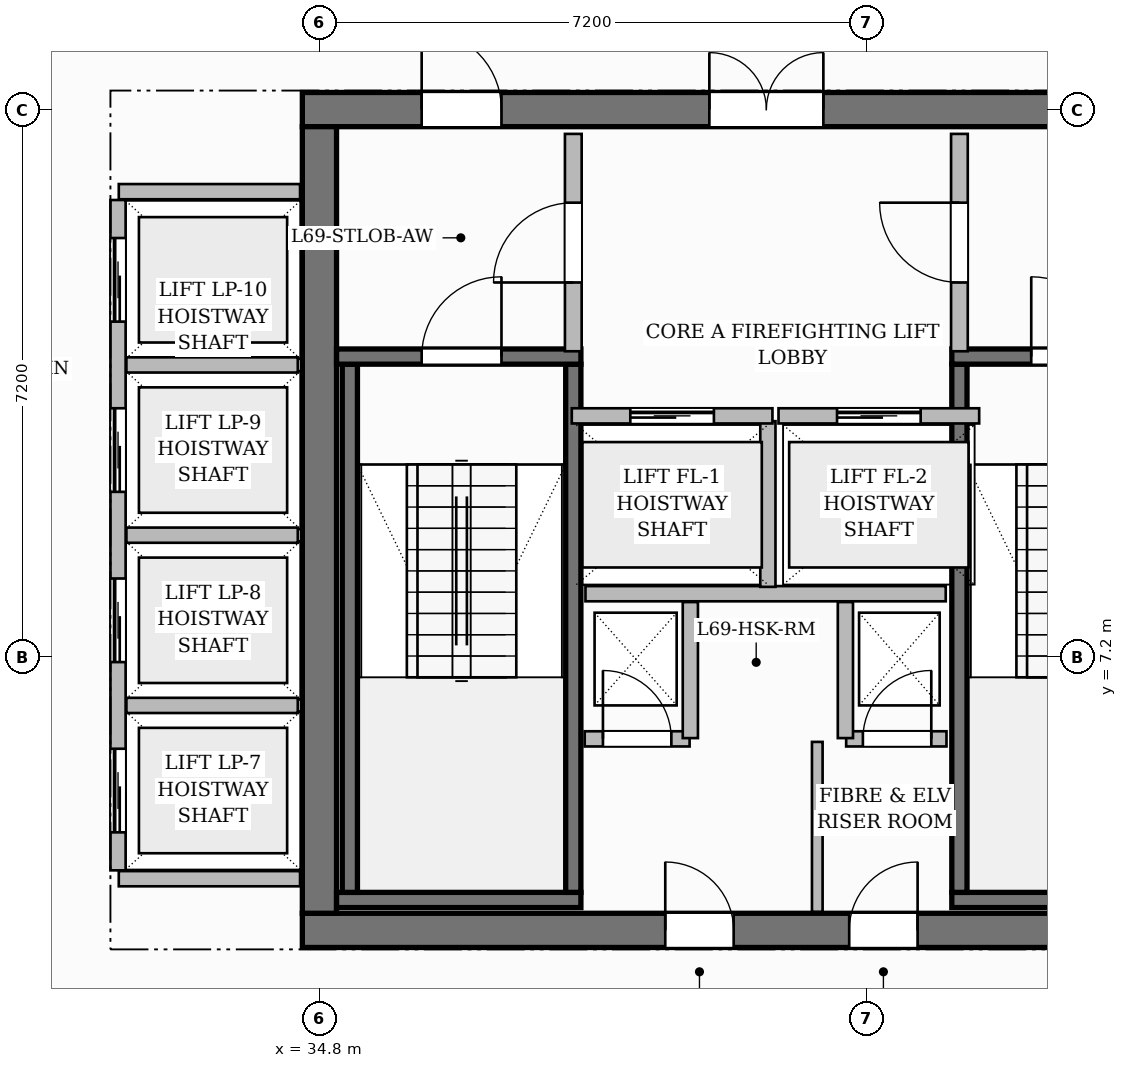
"""IFC4 building model, lengths in metres.
Left out: names, types, materials, properties, quantities, classifications, styles, units other than length and angle.
Written with IfcOpenShell. Run it as: python <this file> out.ifc"""

import sys

from ifc_helpers import new_model, si_unit, direction, frame, frame_2d, origin, place, context, subcontext, project, spatial, rectangle, extrude, source, transform, mapped, element, fill, save


model = new_model("IFC4")
c1 = context("Model", 3, precision=1e-05, world=origin(), true_north=direction((0.0, 1.0)))
c2 = subcontext(c1, "Body", "Model", "MODEL_VIEW")
j1 = project(units=[si_unit("LENGTHUNIT", "METRE"), si_unit("PLANEANGLEUNIT", "RADIAN")], contexts=[c1])
p1 = place(None, origin())
s1 = spatial("IfcSite", under=j1, at=p1, CompositionType="ELEMENT")
p2 = place(p1, origin())
s2 = spatial("IfcBuilding", under=s1, at=p2, CompositionType="ELEMENT")
p3 = place(p2, frame((0.0, 0.0, 275.05)))
s3 = spatial("IfcBuildingStorey", under=s2, at=p3, CompositionType="ELEMENT", Elevation=275.05)
p4 = place(p3, frame((34.575, 3.6, 0.0), z_axis=(0.0, 0.0, 1.0), x_axis=(1.0, 0.0, 0.0)))
e1 = element("IfcWall", 1, at=p4, inside=s3, PredefinedType="SHEAR", context=c2, shape_type="SweptSolid", body=[
    extrude(rectangle(XDim=15.45, YDim=0.45, at=frame_2d((7.725, 0.0))), origin(), (0.0, 0.0, 1.0), 3.85),
])
p5 = place(p4, frame((4.775, 0.0, 0.0)))
e2 = element("IfcOpeningElement", 2, at=p5, cuts=e1, PredefinedType="OPENING", context=c2, shape_type="SweptSolid", body=[
    extrude(rectangle(XDim=0.9, YDim=2.1, at=frame_2d((0.45, 1.05))), frame((0.0, 0.235, 0.0), z_axis=(0.0, -1.0, 0.0), x_axis=(1.0, 0.0, 0.0)), (0.0, 0.0, 1.0), 0.47),
])
p6 = place(p4, frame((7.195, 0.0, 0.0)))
e3 = element("IfcOpeningElement", 3, at=p6, cuts=e1, PredefinedType="OPENING", context=c2, shape_type="SweptSolid", body=[
    extrude(rectangle(XDim=0.9, YDim=2.1, at=frame_2d((0.45, 1.05))), frame((0.0, 0.235, 0.0), z_axis=(0.0, -1.0, 0.0), x_axis=(1.0, 0.0, 0.0)), (0.0, 0.0, 1.0), 0.47),
])
p7 = place(p3, frame((34.575, 14.4, 0.0), z_axis=(0.0, 0.0, 1.0), x_axis=(1.0, 0.0, 0.0)))
e4 = element("IfcWall", 4, at=p7, inside=s3, PredefinedType="SHEAR", context=c2, shape_type="SweptSolid", body=[
    extrude(rectangle(XDim=15.45, YDim=0.45, at=frame_2d((7.725, 0.0))), origin(), (0.0, 0.0, 1.0), 3.85),
])
p8 = place(p7, frame((5.355, 0.0, 0.0)))
e5 = element("IfcOpeningElement", 5, at=p8, cuts=e4, PredefinedType="OPENING", context=c2, shape_type="SweptSolid", body=[
    extrude(rectangle(XDim=1.5, YDim=2.2, at=frame_2d((0.75, 1.1))), frame((0.0, 0.235, 0.0), z_axis=(0.0, -1.0, 0.0), x_axis=(1.0, 0.0, 0.0)), (0.0, 0.0, 1.0), 0.47),
])
p9 = place(p7, frame((1.57, 0.0, 0.0)))
e6 = element("IfcOpeningElement", 6, at=p9, cuts=e4, PredefinedType="OPENING", context=c2, shape_type="SweptSolid", body=[
    extrude(rectangle(XDim=1.05, YDim=2.15, at=frame_2d((0.525, 1.075))), frame((0.0, 0.235, 0.0), z_axis=(0.0, -1.0, 0.0), x_axis=(1.0, 0.0, 0.0)), (0.0, 0.0, 1.0), 0.47),
])
p10 = place(p7, frame((11.2, 0.0, 0.0)))
e7 = element("IfcOpeningElement", 7, at=p10, cuts=e4, PredefinedType="OPENING", context=c2, shape_type="SweptSolid", body=[
    extrude(rectangle(XDim=1.05, YDim=2.15, at=frame_2d((0.525, 1.075))), frame((0.0, 0.235, 0.0), z_axis=(0.0, -1.0, 0.0), x_axis=(1.0, 0.0, 0.0)), (0.0, 0.0, 1.0), 0.47),
])
p11 = place(p3, frame((34.8, 3.825, 0.0), z_axis=(0.0, 0.0, 1.0), x_axis=(0.0, 1.0, 0.0)))
e8 = element("IfcWall", 8, at=p11, inside=s3, PredefinedType="SHEAR", context=c2, shape_type="SweptSolid", body=[
    extrude(rectangle(XDim=10.35, YDim=0.45, at=frame_2d((5.175, 0.0))), origin(), (0.0, 0.0, 1.0), 3.85),
])
p12 = place(p3, frame((35.025, 4.0, 0.0), z_axis=(0.0, 0.0, 1.0), x_axis=(1.0, 0.0, 0.0)))
e9 = element("IfcWall", 9, at=p12, inside=s3, PredefinedType="SHEAR", context=c2, shape_type="SweptSolid", body=[
    extrude(rectangle(XDim=3.215, YDim=0.2, at=frame_2d((1.607, 0.0))), origin(), (0.0, 0.0, 1.0), 3.85),
])
for number, where, z_axis, x_axis in (
    (10, (35.2, 4.1, 0.0), (0.0, 0.0, 1.0), (0.0, 1.0, 0.0)),
    (11, (38.14, 4.1, 0.0), (0.0, 0.0, 1.0), (0.0, 1.0, 0.0)),
):
    element("IfcWall", number, at=place(p3, frame(where, z_axis=z_axis, x_axis=x_axis)), inside=s3, PredefinedType="SHEAR", context=c2, shape_type="SweptSolid", body=[
        extrude(rectangle(XDim=6.95, YDim=0.2, at=frame_2d((3.475, 0.0))), origin(), (0.0, 0.0, 1.0), 3.85),
    ])
p13 = place(p3, frame((35.025, 11.15, 0.0), z_axis=(0.0, 0.0, 1.0), x_axis=(1.0, 0.0, 0.0)))
e12 = element("IfcWall", 12, at=p13, inside=s3, PredefinedType="SHEAR", context=c2, shape_type="SweptSolid", body=[
    extrude(rectangle(XDim=3.215, YDim=0.2, at=frame_2d((1.607, 0.0))), origin(), (0.0, 0.0, 1.0), 3.85),
])
p14 = place(p13, frame((1.12, 0.0, 0.0)))
e13 = element("IfcOpeningElement", 13, at=p14, cuts=e12, PredefinedType="OPENING", context=c2, shape_type="SweptSolid", body=[
    extrude(rectangle(XDim=1.05, YDim=2.2, at=frame_2d((0.525, 1.1))), frame((0.0, 0.11, 0.0), z_axis=(0.0, -1.0, 0.0), x_axis=(1.0, 0.0, 0.0)), (0.0, 0.0, 1.0), 0.22),
])
p15 = place(p3, frame((43.12, 4.0, 0.0), z_axis=(0.0, 0.0, 1.0), x_axis=(1.0, 0.0, 0.0)))
e14 = element("IfcWall", 14, at=p15, inside=s3, PredefinedType="SHEAR", context=c2, shape_type="SweptSolid", body=[
    extrude(rectangle(XDim=6.455, YDim=0.2, at=frame_2d((3.228, 0.0))), origin(), (0.0, 0.0, 1.0), 3.85),
])
p16 = place(p3, frame((43.22, 4.1, 0.0), z_axis=(0.0, 0.0, 1.0), x_axis=(0.0, 1.0, 0.0)))
e15 = element("IfcWall", 15, at=p16, inside=s3, PredefinedType="SHEAR", context=c2, shape_type="SweptSolid", body=[
    extrude(rectangle(XDim=6.95, YDim=0.2, at=frame_2d((3.475, 0.0))), origin(), (0.0, 0.0, 1.0), 3.85),
])
p17 = place(p3, frame((43.12, 11.15, 0.0), z_axis=(0.0, 0.0, 1.0), x_axis=(1.0, 0.0, 0.0)))
e16 = element("IfcWall", 16, at=p17, inside=s3, PredefinedType="SHEAR", context=c2, shape_type="SweptSolid", body=[
    extrude(rectangle(XDim=6.455, YDim=0.2, at=frame_2d((3.228, 0.0))), origin(), (0.0, 0.0, 1.0), 3.85),
])
p18 = place(p17, frame((1.045, 0.0, 0.0)))
e17 = element("IfcOpeningElement", 17, at=p18, cuts=e16, PredefinedType="OPENING", context=c2, shape_type="SweptSolid", body=[
    extrude(rectangle(XDim=1.05, YDim=2.2, at=frame_2d((0.525, 1.1))), frame((0.0, 0.11, 0.0), z_axis=(0.0, -1.0, 0.0), x_axis=(1.0, 0.0, 0.0)), (0.0, 0.0, 1.0), 0.22),
])
p19 = place(p17, frame((4.125, 0.0, 0.0)))
e18 = element("IfcOpeningElement", 18, at=p19, cuts=e16, PredefinedType="OPENING", context=c2, shape_type="SweptSolid", body=[
    extrude(rectangle(XDim=1.05, YDim=2.2, at=frame_2d((0.525, 1.1))), frame((0.0, 0.11, 0.0), z_axis=(0.0, -1.0, 0.0), x_axis=(1.0, 0.0, 0.0)), (0.0, 0.0, 1.0), 0.22),
])
p20 = place(p3, frame((38.3, 8.03, 0.0), z_axis=(0.0, 0.0, 1.0), x_axis=(1.0, 0.0, 0.0)))
e19 = element("IfcWall", 19, at=p20, inside=s3, PredefinedType="PARTITIONING", context=c2, shape_type="SweptSolid", body=[
    extrude(rectangle(XDim=4.74, YDim=0.2, at=frame_2d((2.37, 0.0))), origin(), (0.0, 0.0, 1.0), 3.6),
])
p21 = place(p3, frame((40.7, 8.12, 0.0), z_axis=(0.0, 0.0, 1.0), x_axis=(0.0, 1.0, 0.0)))
e20 = element("IfcWall", 20, at=p21, inside=s3, PredefinedType="PARTITIONING", context=c2, shape_type="SweptSolid", body=[
    extrude(rectangle(XDim=2.18, YDim=0.2, at=frame_2d((1.09, 0.0))), origin(), (0.0, 0.0, 1.0), 3.6),
])
p22 = place(p3, frame((38.14, 11.22, 0.0), z_axis=(0.0, 0.0, 1.0), x_axis=(0.0, 1.0, 0.0)))
e21 = element("IfcWall", 21, at=p22, inside=s3, PredefinedType="PARTITIONING", context=c2, shape_type="SweptSolid", body=[
    extrude(rectangle(XDim=2.86, YDim=0.22, at=frame_2d((1.43, 0.0))), origin(), (0.0, 0.0, 1.0), 3.6),
])
p23 = place(p22, frame((0.905, 0.0, 0.0)))
e22 = element("IfcOpeningElement", 22, at=p23, cuts=e21, PredefinedType="OPENING", context=c2, shape_type="SweptSolid", body=[
    extrude(rectangle(XDim=1.05, YDim=2.15, at=frame_2d((0.525, 1.075))), frame((0.0, 0.12, 0.0), z_axis=(0.0, -1.0, 0.0), x_axis=(1.0, 0.0, 0.0)), (0.0, 0.0, 1.0), 0.24),
])
p24 = place(p3, frame((43.22, 11.22, 0.0), z_axis=(0.0, 0.0, 1.0), x_axis=(0.0, 1.0, 0.0)))
e23 = element("IfcWall", 23, at=p24, inside=s3, PredefinedType="PARTITIONING", context=c2, shape_type="SweptSolid", body=[
    extrude(rectangle(XDim=2.86, YDim=0.22, at=frame_2d((1.43, 0.0))), origin(), (0.0, 0.0, 1.0), 3.6),
])
p25 = place(p24, frame((0.905, 0.0, 0.0)))
e24 = element("IfcOpeningElement", 24, at=p25, cuts=e23, PredefinedType="OPENING", context=c2, shape_type="SweptSolid", body=[
    extrude(rectangle(XDim=1.05, YDim=2.15, at=frame_2d((0.525, 1.075))), frame((0.0, 0.12, 0.0), z_axis=(0.0, -1.0, 0.0), x_axis=(1.0, 0.0, 0.0)), (0.0, 0.0, 1.0), 0.24),
])
p26 = place(p3, frame((38.29, 6.12, 0.0), z_axis=(0.0, 0.0, 1.0), x_axis=(1.0, 0.0, 0.0)))
e25 = element("IfcWall", 25, at=p26, inside=s3, PredefinedType="PARTITIONING", context=c2, shape_type="SweptSolid", body=[
    extrude(rectangle(XDim=1.38, YDim=0.2, at=frame_2d((0.69, 0.0))), origin(), (0.0, 0.0, 1.0), 3.6),
])
p27 = place(p26, frame((0.24, 0.0, 0.0)))
e26 = element("IfcOpeningElement", 26, at=p27, cuts=e25, PredefinedType="OPENING", context=c2, shape_type="SweptSolid", body=[
    extrude(rectangle(XDim=0.9, YDim=2.1, at=frame_2d((0.45, 1.05))), frame((0.0, 0.11, 0.0), z_axis=(0.0, -1.0, 0.0), x_axis=(1.0, 0.0, 0.0)), (0.0, 0.0, 1.0), 0.22),
])
p28 = place(p3, frame((39.68, 6.13, 0.0), z_axis=(0.0, 0.0, 1.0), x_axis=(0.0, 1.0, 0.0)))
e27 = element("IfcWall", 27, at=p28, inside=s3, PredefinedType="PARTITIONING", context=c2, shape_type="SweptSolid", body=[
    extrude(rectangle(XDim=1.79, YDim=0.2, at=frame_2d((0.895, 0.0))), origin(), (0.0, 0.0, 1.0), 3.6),
])
p29 = place(p3, frame((41.73, 6.12, 0.0), z_axis=(0.0, 0.0, 1.0), x_axis=(1.0, 0.0, 0.0)))
e28 = element("IfcWall", 28, at=p29, inside=s3, PredefinedType="PARTITIONING", context=c2, shape_type="SweptSolid", body=[
    extrude(rectangle(XDim=1.32, YDim=0.2, at=frame_2d((0.66, 0.0))), origin(), (0.0, 0.0, 1.0), 3.6),
])
p30 = place(p29, frame((0.22, 0.0, 0.0)))
e29 = element("IfcOpeningElement", 29, at=p30, cuts=e28, PredefinedType="OPENING", context=c2, shape_type="SweptSolid", body=[
    extrude(rectangle(XDim=0.9, YDim=2.1, at=frame_2d((0.45, 1.05))), frame((0.0, 0.11, 0.0), z_axis=(0.0, -1.0, 0.0), x_axis=(1.0, 0.0, 0.0)), (0.0, 0.0, 1.0), 0.22),
])
p31 = place(p3, frame((41.72, 6.13, 0.0), z_axis=(0.0, 0.0, 1.0), x_axis=(0.0, 1.0, 0.0)))
e30 = element("IfcWall", 30, at=p31, inside=s3, PredefinedType="PARTITIONING", context=c2, shape_type="SweptSolid", body=[
    extrude(rectangle(XDim=1.79, YDim=0.2, at=frame_2d((0.895, 0.0))), origin(), (0.0, 0.0, 1.0), 3.6),
])
p32 = place(p3, frame((41.35, 3.845, 0.0), z_axis=(0.0, 0.0, 1.0), x_axis=(0.0, 1.0, 0.0)))
e31 = element("IfcWall", 31, at=p32, inside=s3, PredefinedType="PARTITIONING", context=c2, shape_type="SweptSolid", body=[
    extrude(rectangle(XDim=2.235, YDim=0.14, at=frame_2d((1.118, 0.0))), origin(), (0.0, 0.0, 1.0), 3.6),
])
for number, where, z_axis, x_axis in (
    (32, (32.16, 4.28, 0.0), (0.0, 0.0, 1.0), (1.0, 0.0, 0.0)),
    (33, (32.16, 13.32, 0.0), (0.0, 0.0, 1.0), (1.0, 0.0, 0.0)),
):
    element("IfcWall", number, at=place(p3, frame(where, z_axis=z_axis, x_axis=x_axis)), inside=s3, PredefinedType="PARTITIONING", context=c2, shape_type="SweptSolid", body=[
        extrude(rectangle(XDim=2.385, YDim=0.2, at=frame_2d((1.192, 0.0))), origin(), (0.0, 0.0, 1.0), 3.6),
    ])
p33 = place(p3, frame((32.15, 4.39, 0.0), z_axis=(0.0, 0.0, 1.0), x_axis=(0.0, 1.0, 0.0)))
e34 = element("IfcWall", 34, at=p33, inside=s3, PredefinedType="PARTITIONING", context=c2, shape_type="SweptSolid", body=[
    extrude(rectangle(XDim=8.82, YDim=0.2, at=frame_2d((4.41, 0.0))), origin(), (0.0, 0.0, 1.0), 3.6),
])
p34 = place(p33, frame((0.5, 0.0, 0.0)))
e35 = element("IfcOpeningElement", 35, at=p34, cuts=e34, PredefinedType="OPENING", context=c2, shape_type="SweptSolid", body=[
    extrude(rectangle(XDim=1.1, YDim=2.2, at=frame_2d((0.55, 1.1))), frame((0.0, 0.11, 0.0), z_axis=(0.0, -1.0, 0.0), x_axis=(1.0, 0.0, 0.0)), (0.0, 0.0, 1.0), 0.22),
])
p35 = place(p33, frame((2.74, 0.0, 0.0)))
e36 = element("IfcOpeningElement", 36, at=p35, cuts=e34, PredefinedType="OPENING", context=c2, shape_type="SweptSolid", body=[
    extrude(rectangle(XDim=1.1, YDim=2.2, at=frame_2d((0.55, 1.1))), frame((0.0, 0.11, 0.0), z_axis=(0.0, -1.0, 0.0), x_axis=(1.0, 0.0, 0.0)), (0.0, 0.0, 1.0), 0.22),
])
p36 = place(p33, frame((4.98, 0.0, 0.0)))
e37 = element("IfcOpeningElement", 37, at=p36, cuts=e34, PredefinedType="OPENING", context=c2, shape_type="SweptSolid", body=[
    extrude(rectangle(XDim=1.1, YDim=2.2, at=frame_2d((0.55, 1.1))), frame((0.0, 0.11, 0.0), z_axis=(0.0, -1.0, 0.0), x_axis=(1.0, 0.0, 0.0)), (0.0, 0.0, 1.0), 0.22),
])
p37 = place(p33, frame((7.22, 0.0, 0.0)))
e38 = element("IfcOpeningElement", 38, at=p37, cuts=e34, PredefinedType="OPENING", context=c2, shape_type="SweptSolid", body=[
    extrude(rectangle(XDim=1.1, YDim=2.2, at=frame_2d((0.55, 1.1))), frame((0.0, 0.11, 0.0), z_axis=(0.0, -1.0, 0.0), x_axis=(1.0, 0.0, 0.0)), (0.0, 0.0, 1.0), 0.22),
])
for number, where, z_axis, x_axis in (
    (39, (32.26, 6.56, 0.0), (0.0, 0.0, 1.0), (1.0, 0.0, 0.0)),
    (40, (32.26, 8.8, 0.0), (0.0, 0.0, 1.0), (1.0, 0.0, 0.0)),
    (41, (32.26, 11.04, 0.0), (0.0, 0.0, 1.0), (1.0, 0.0, 0.0)),
):
    element("IfcWall", number, at=place(p3, frame(where, z_axis=z_axis, x_axis=x_axis)), inside=s3, PredefinedType="PARTITIONING", context=c2, shape_type="SweptSolid", body=[
        extrude(rectangle(XDim=2.255, YDim=0.2, at=frame_2d((1.127, 0.0))), origin(), (0.0, 0.0, 1.0), 3.6),
    ])
p38 = place(p3, frame((38.12, 10.37, 0.0), z_axis=(0.0, 0.0, 1.0), x_axis=(1.0, 0.0, 0.0)))
e42 = element("IfcWall", 42, at=p38, inside=s3, PredefinedType="PARTITIONING", context=c2, shape_type="SweptSolid", body=[
    extrude(rectangle(XDim=2.64, YDim=0.2, at=frame_2d((1.32, 0.0))), origin(), (0.0, 0.0, 1.0), 3.6),
])
p39 = place(p38, frame((0.77, 0.0, 0.0)))
e43 = element("IfcOpeningElement", 43, at=p39, cuts=e42, PredefinedType="OPENING", context=c2, shape_type="SweptSolid", body=[
    extrude(rectangle(XDim=1.1, YDim=2.2, at=frame_2d((0.55, 1.1))), frame((0.0, 0.11, 0.0), z_axis=(0.0, -1.0, 0.0), x_axis=(1.0, 0.0, 0.0)), (0.0, 0.0, 1.0), 0.22),
])
p40 = place(p3, frame((40.84, 10.37, 0.0), z_axis=(0.0, 0.0, 1.0), x_axis=(1.0, 0.0, 0.0)))
e44 = element("IfcWall", 44, at=p40, inside=s3, PredefinedType="PARTITIONING", context=c2, shape_type="SweptSolid", body=[
    extrude(rectangle(XDim=2.64, YDim=0.2, at=frame_2d((1.32, 0.0))), origin(), (0.0, 0.0, 1.0), 3.6),
])
p41 = place(p40, frame((0.77, 0.0, 0.0)))
e45 = element("IfcOpeningElement", 45, at=p41, cuts=e44, PredefinedType="OPENING", context=c2, shape_type="SweptSolid", body=[
    extrude(rectangle(XDim=1.1, YDim=2.2, at=frame_2d((0.55, 1.1))), frame((0.0, 0.11, 0.0), z_axis=(0.0, -1.0, 0.0), x_axis=(1.0, 0.0, 0.0)), (0.0, 0.0, 1.0), 0.22),
])
m1 = source(origin(), c2, "Body", "SweptSolid", [
    extrude(rectangle(XDim=1.05, YDim=2.2, at=frame_2d((0.525, 1.1))), frame((0.0, 0.025, 0.0), z_axis=(0.0, -1.0, 0.0), x_axis=(1.0, 0.0, 0.0)), (0.0, 0.0, 1.0), 0.05),
])
p42 = place(p14, origin())
e46 = element("IfcDoor", 46, at=p42, inside=s3, OperationType="SINGLE_SWING_RIGHT", PredefinedType="DOOR", context=c2, shape_type="MappedRepresentation", body=[
    mapped(m1, transform((0.0, 0.0, 0.0), scale=1.0)),
])
fill(e13, e46)
p43 = place(p18, origin())
e47 = element("IfcDoor", 47, at=p43, inside=s3, OperationType="SINGLE_SWING_LEFT", PredefinedType="DOOR", context=c2, shape_type="MappedRepresentation", body=[
    mapped(m1, transform((0.0, 0.0, 0.0), scale=1.0)),
])
fill(e17, e47)
m2 = source(origin(), c2, "Body", "SweptSolid", [
    extrude(rectangle(XDim=1.05, YDim=2.15, at=frame_2d((0.525, 1.075))), frame((0.0, 0.025, 0.0), z_axis=(0.0, -1.0, 0.0), x_axis=(1.0, 0.0, 0.0)), (0.0, 0.0, 1.0), 0.05),
])
p44 = place(p23, origin())
e48 = element("IfcDoor", 48, at=p44, inside=s3, OperationType="SINGLE_SWING_LEFT", PredefinedType="DOOR", context=c2, shape_type="MappedRepresentation", body=[
    mapped(m2, transform((0.0, 0.0, 0.0), scale=1.0)),
])
fill(e22, e48)
p45 = place(p25, origin())
e49 = element("IfcDoor", 49, at=p45, inside=s3, OperationType="SINGLE_SWING_RIGHT", PredefinedType="DOOR", context=c2, shape_type="MappedRepresentation", body=[
    mapped(m2, transform((0.0, 0.0, 0.0), scale=1.0)),
])
fill(e24, e49)
m3 = source(origin(), c2, "Body", "SweptSolid", [
    extrude(rectangle(XDim=1.5, YDim=2.2, at=frame_2d((0.75, 1.1))), frame((0.0, 0.025, 0.0), z_axis=(0.0, -1.0, 0.0), x_axis=(1.0, 0.0, 0.0)), (0.0, 0.0, 1.0), 0.05),
])
p46 = place(p8, origin())
e50 = element("IfcDoor", 50, at=p46, inside=s3, OperationType="DOUBLE_DOOR_SINGLE_SWING", PredefinedType="DOOR", context=c2, shape_type="MappedRepresentation", body=[
    mapped(m3, transform((0.0, 0.0, 0.0), scale=1.0)),
])
fill(e5, e50)
p47 = place(p9, origin())
e51 = element("IfcDoor", 51, at=p47, inside=s3, OperationType="SINGLE_SWING_LEFT", PredefinedType="DOOR", context=c2, shape_type="MappedRepresentation", body=[
    mapped(m2, transform((0.0, 0.0, 0.0), scale=1.0)),
])
fill(e6, e51)
m4 = source(origin(), c2, "Body", "SweptSolid", [
    extrude(rectangle(XDim=0.9, YDim=2.1, at=frame_2d((0.45, 1.05))), frame((0.0, 0.025, 0.0), z_axis=(0.0, -1.0, 0.0), x_axis=(1.0, 0.0, 0.0)), (0.0, 0.0, 1.0), 0.05),
])
p48 = place(p27, origin())
e52 = element("IfcDoor", 52, at=p48, inside=s3, OperationType="SINGLE_SWING_LEFT", PredefinedType="DOOR", context=c2, shape_type="MappedRepresentation", body=[
    mapped(m4, transform((0.0, 0.0, 0.0), scale=1.0)),
])
fill(e26, e52)
p49 = place(p30, origin())
e53 = element("IfcDoor", 53, at=p49, inside=s3, OperationType="SINGLE_SWING_RIGHT", PredefinedType="DOOR", context=c2, shape_type="MappedRepresentation", body=[
    mapped(m4, transform((0.0, 0.0, 0.0), scale=1.0)),
])
fill(e29, e53)
p50 = place(p5, origin())
e54 = element("IfcDoor", 54, at=p50, inside=s3, OperationType="SINGLE_SWING_LEFT", PredefinedType="DOOR", context=c2, shape_type="MappedRepresentation", body=[
    mapped(m4, transform((0.0, 0.0, 0.0), scale=1.0)),
])
fill(e2, e54)
p51 = place(p6, origin())
e55 = element("IfcDoor", 55, at=p51, inside=s3, OperationType="SINGLE_SWING_RIGHT", PredefinedType="DOOR", context=c2, shape_type="MappedRepresentation", body=[
    mapped(m4, transform((0.0, 0.0, 0.0), scale=1.0)),
])
fill(e3, e55)
m5 = source(origin(), c2, "Body", "SweptSolid", [
    extrude(rectangle(XDim=1.1, YDim=2.2, at=frame_2d((0.55, 1.1))), frame((0.0, 0.025, 0.0), z_axis=(0.0, -1.0, 0.0), x_axis=(1.0, 0.0, 0.0)), (0.0, 0.0, 1.0), 0.05),
])
p52 = place(p39, origin())
e56 = element("IfcDoor", 56, at=p52, inside=s3, OperationType="SLIDING_TO_LEFT", PredefinedType="DOOR", context=c2, shape_type="MappedRepresentation", body=[
    mapped(m5, transform((0.0, 0.0, 0.0), scale=1.0)),
])
fill(e43, e56)
p53 = place(p41, origin())
e57 = element("IfcDoor", 57, at=p53, inside=s3, OperationType="SLIDING_TO_LEFT", PredefinedType="DOOR", context=c2, shape_type="MappedRepresentation", body=[
    mapped(m5, transform((0.0, 0.0, 0.0), scale=1.0)),
])
fill(e45, e57)
p54 = place(p34, origin())
e58 = element("IfcDoor", 58, at=p54, inside=s3, OperationType="SLIDING_TO_LEFT", PredefinedType="DOOR", context=c2, shape_type="MappedRepresentation", body=[
    mapped(m5, transform((0.0, 0.0, 0.0), scale=1.0)),
])
fill(e35, e58)
p55 = place(p35, origin())
e59 = element("IfcDoor", 59, at=p55, inside=s3, OperationType="SLIDING_TO_LEFT", PredefinedType="DOOR", context=c2, shape_type="MappedRepresentation", body=[
    mapped(m5, transform((0.0, 0.0, 0.0), scale=1.0)),
])
fill(e36, e59)
p56 = place(p36, origin())
e60 = element("IfcDoor", 60, at=p56, inside=s3, OperationType="SLIDING_TO_LEFT", PredefinedType="DOOR", context=c2, shape_type="MappedRepresentation", body=[
    mapped(m5, transform((0.0, 0.0, 0.0), scale=1.0)),
])
fill(e37, e60)
p57 = place(p37, origin())
e61 = element("IfcDoor", 61, at=p57, inside=s3, OperationType="SLIDING_TO_LEFT", PredefinedType="DOOR", context=c2, shape_type="MappedRepresentation", body=[
    mapped(m5, transform((0.0, 0.0, 0.0), scale=1.0)),
])
fill(e38, e61)
save(model, sys.argv[1])
